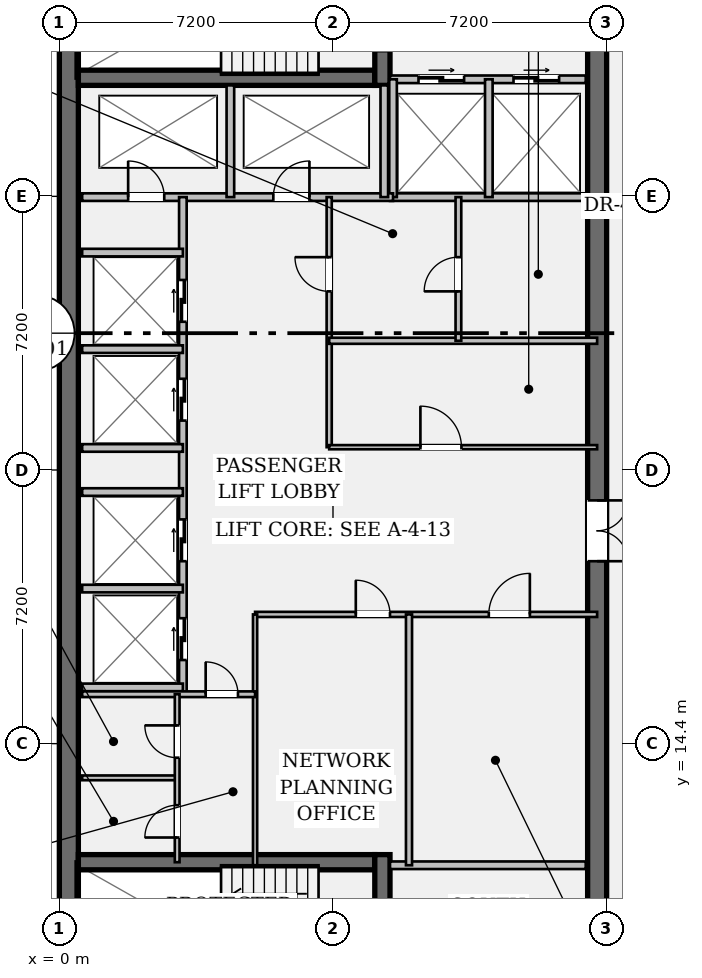
"""IFC4 building model, lengths in metres.
Left out: names, types, materials, properties, quantities, classifications, styles, units other than length and angle.
Written with IfcOpenShell. Run it as: python <this file> out.ifc"""

import sys

from ifc_helpers import new_model, si_unit, direction, frame, frame_2d, origin, place, context, subcontext, project, spatial, rectangle, extrude, element, fill, save


model = new_model("IFC4")
c1 = context("Model", 3, precision=1e-05, world=origin(), true_north=direction((0.0, 1.0)))
c2 = subcontext(c1, "Body", "Model", "MODEL_VIEW")
j1 = project(units=[si_unit("LENGTHUNIT", "METRE"), si_unit("PLANEANGLEUNIT", "RADIAN")], contexts=[c1])
p1 = place(None, origin())
s1 = spatial("IfcSite", under=j1, at=p1, CompositionType="ELEMENT")
p2 = place(p1, origin())
s2 = spatial("IfcBuilding", under=s1, at=p2, CompositionType="ELEMENT")
p3 = place(p2, frame((0.0, 0.0, 251.65)))
s3 = spatial("IfcBuildingStorey", under=s2, at=p3, CompositionType="ELEMENT", Elevation=251.65)
p4 = place(p3, frame((0.25, 7.2, 0.0), z_axis=(0.0, 0.0, 1.0), x_axis=(0.0, 1.0, 0.0)))
e1 = element("IfcWall", 1, at=p4, inside=s3, PredefinedType="SHEAR", context=c2, shape_type="SweptSolid", body=[
    extrude(rectangle(XDim=28.8, YDim=0.5, at=frame_2d((14.4, 0.0))), origin(), (0.0, 0.0, 1.0), 3.24),
])
p5 = place(p3, frame((14.15, 35.5, 0.0), z_axis=(0.0, 0.0, 1.0), x_axis=(0.0, -1.0, 0.0)))
e2 = element("IfcWall", 2, at=p5, inside=s3, PredefinedType="SHEAR", context=c2, shape_type="SweptSolid", body=[
    extrude(rectangle(XDim=27.8, YDim=0.5, at=frame_2d((13.9, 0.0))), origin(), (0.0, 0.0, 1.0), 3.24),
])
p6 = place(p5, frame((1.4, 0.0, 0.0)))
e3 = element("IfcOpeningElement", 3, at=p6, cuts=e2, PredefinedType="OPENING", context=c2, shape_type="SweptSolid", body=[
    extrude(rectangle(XDim=1.2, YDim=2.15, at=frame_2d((0.6, 1.075))), frame((0.0, 0.262, 0.0), z_axis=(0.0, -1.0, 0.0), x_axis=(1.0, 0.0, 0.0)), (0.0, 0.0, 1.0), 0.524),
])
p7 = place(p5, frame((25.35, 0.0, 0.0)))
e4 = element("IfcOpeningElement", 4, at=p7, cuts=e2, PredefinedType="OPENING", context=c2, shape_type="SweptSolid", body=[
    extrude(rectangle(XDim=1.2, YDim=2.15, at=frame_2d((0.6, 1.075))), frame((0.0, 0.262, 0.0), z_axis=(0.0, -1.0, 0.0), x_axis=(1.0, 0.0, 0.0)), (0.0, 0.0, 1.0), 0.524),
])
p8 = place(p5, frame((14.7, 0.0, 0.0)))
e5 = element("IfcOpeningElement", 5, at=p8, cuts=e2, PredefinedType="OPENING", context=c2, shape_type="SweptSolid", body=[
    extrude(rectangle(XDim=1.6, YDim=2.2, at=frame_2d((0.8, 1.1))), frame((0.0, 0.262, 0.0), z_axis=(0.0, -1.0, 0.0), x_axis=(1.0, 0.0, 0.0)), (0.0, 0.0, 1.0), 0.524),
])
for number, where, z_axis, x_axis in (
    (6, (0.5, 31.92, 0.0), (0.0, 0.0, 1.0), (1.0, 0.0, 0.0)),
    (7, (0.5, 11.28, 0.0), (0.0, 0.0, 1.0), (1.0, 0.0, 0.0)),
):
    element("IfcWall", number, at=place(p3, frame(where, z_axis=z_axis, x_axis=x_axis)), inside=s3, PredefinedType="SHEAR", context=c2, shape_type="SweptSolid", body=[
        extrude(rectangle(XDim=7.8, YDim=0.4, at=frame_2d((3.9, 0.0))), origin(), (0.0, 0.0, 1.0), 3.24),
    ])
p9 = place(p3, frame((8.5, 31.72, 0.0), z_axis=(0.0, 0.0, 1.0), x_axis=(0.0, 1.0, 0.0)))
e8 = element("IfcWall", 8, at=p9, inside=s3, PredefinedType="SHEAR", context=c2, shape_type="SweptSolid", body=[
    extrude(rectangle(XDim=3.78, YDim=0.4, at=frame_2d((1.89, 0.0))), origin(), (0.0, 0.0, 1.0), 3.24),
])
p10 = place(p9, frame((0.9, 0.0, 0.0)))
e9 = element("IfcOpeningElement", 9, at=p10, cuts=e8, PredefinedType="OPENING", context=c2, shape_type="SweptSolid", body=[
    extrude(rectangle(XDim=1.1, YDim=2.15, at=frame_2d((0.55, 1.075))), frame((0.0, 0.212, 0.0), z_axis=(0.0, -1.0, 0.0), x_axis=(1.0, 0.0, 0.0)), (0.0, 0.0, 1.0), 0.424),
])
p11 = place(p3, frame((8.5, 7.7, 0.0), z_axis=(0.0, 0.0, 1.0), x_axis=(0.0, 1.0, 0.0)))
e10 = element("IfcWall", 10, at=p11, inside=s3, PredefinedType="SHEAR", context=c2, shape_type="SweptSolid", body=[
    extrude(rectangle(XDim=3.78, YDim=0.4, at=frame_2d((1.89, 0.0))), origin(), (0.0, 0.0, 1.0), 3.24),
])
p12 = place(p11, frame((0.85, 0.0, 0.0)))
e11 = element("IfcOpeningElement", 11, at=p12, cuts=e10, PredefinedType="OPENING", context=c2, shape_type="SweptSolid", body=[
    extrude(rectangle(XDim=1.1, YDim=2.15, at=frame_2d((0.55, 1.075))), frame((0.0, 0.212, 0.0), z_axis=(0.0, -1.0, 0.0), x_axis=(1.0, 0.0, 0.0)), (0.0, 0.0, 1.0), 0.424),
])
p13 = place(p3, frame((8.7, 31.88, 0.0), z_axis=(0.0, 0.0, 1.0), x_axis=(1.0, 0.0, 0.0)))
e12 = element("IfcWall", 12, at=p13, inside=s3, PredefinedType="PARTITIONING", context=c2, shape_type="SweptSolid", body=[
    extrude(rectangle(XDim=5.15, YDim=0.2, at=frame_2d((2.575, 0.0))), origin(), (0.0, 0.0, 1.0), 3.24),
])
p14 = place(p13, frame((0.75, 0.0, 0.0)))
e13 = element("IfcOpeningElement", 13, at=p14, cuts=e12, PredefinedType="OPENING", context=c2, shape_type="SweptSolid", body=[
    extrude(rectangle(XDim=1.2, YDim=2.2, at=frame_2d((0.6, 1.1))), frame((0.0, 0.112, 0.0), z_axis=(0.0, -1.0, 0.0), x_axis=(1.0, 0.0, 0.0)), (0.0, 0.0, 1.0), 0.224),
])
p15 = place(p13, frame((3.25, 0.0, 0.0)))
e14 = element("IfcOpeningElement", 14, at=p15, cuts=e12, PredefinedType="OPENING", context=c2, shape_type="SweptSolid", body=[
    extrude(rectangle(XDim=1.2, YDim=2.2, at=frame_2d((0.6, 1.1))), frame((0.0, 0.112, 0.0), z_axis=(0.0, -1.0, 0.0), x_axis=(1.0, 0.0, 0.0)), (0.0, 0.0, 1.0), 0.224),
])
for number, where, z_axis, x_axis in (
    (15, (8.7, 11.2, 0.0), (0.0, 0.0, 1.0), (1.0, 0.0, 0.0)),
    (16, (8.7, 28.78, 0.0), (0.0, 0.0, 1.0), (1.0, 0.0, 0.0)),
):
    element("IfcWall", number, at=place(p3, frame(where, z_axis=z_axis, x_axis=x_axis)), inside=s3, PredefinedType="PARTITIONING", context=c2, shape_type="SweptSolid", body=[
        extrude(rectangle(XDim=5.15, YDim=0.2, at=frame_2d((2.575, 0.0))), origin(), (0.0, 0.0, 1.0), 3.24),
    ])
for number, where, z_axis, x_axis in (
    (17, (8.78, 28.78, 0.0), (0.0, 0.0, 1.0), (0.0, 1.0, 0.0)),
    (18, (11.3, 28.78, 0.0), (0.0, 0.0, 1.0), (0.0, 1.0, 0.0)),
):
    element("IfcWall", number, at=place(p3, frame(where, z_axis=z_axis, x_axis=x_axis)), inside=s3, PredefinedType="PARTITIONING", context=c2, shape_type="SweptSolid", body=[
        extrude(rectangle(XDim=3.1, YDim=0.2, at=frame_2d((1.55, 0.0))), origin(), (0.0, 0.0, 1.0), 3.24),
    ])
p16 = place(p3, frame((0.6, 28.78, 0.0), z_axis=(0.0, 0.0, 1.0), x_axis=(1.0, 0.0, 0.0)))
e19 = element("IfcWall", 19, at=p16, inside=s3, PredefinedType="PARTITIONING", context=c2, shape_type="SweptSolid", body=[
    extrude(rectangle(XDim=8.18, YDim=0.2, at=frame_2d((4.09, 0.0))), origin(), (0.0, 0.0, 1.0), 3.24),
])
p17 = place(p16, frame((1.21, 0.0, 0.0)))
e20 = element("IfcOpeningElement", 20, at=p17, cuts=e19, PredefinedType="OPENING", context=c2, shape_type="SweptSolid", body=[
    extrude(rectangle(XDim=0.95, YDim=2.15, at=frame_2d((0.475, 1.075))), frame((0.0, 0.112, 0.0), z_axis=(0.0, -1.0, 0.0), x_axis=(1.0, 0.0, 0.0)), (0.0, 0.0, 1.0), 0.224),
])
p18 = place(p16, frame((5.03, 0.0, 0.0)))
e21 = element("IfcOpeningElement", 21, at=p18, cuts=e19, PredefinedType="OPENING", context=c2, shape_type="SweptSolid", body=[
    extrude(rectangle(XDim=0.95, YDim=2.15, at=frame_2d((0.475, 1.075))), frame((0.0, 0.112, 0.0), z_axis=(0.0, -1.0, 0.0), x_axis=(1.0, 0.0, 0.0)), (0.0, 0.0, 1.0), 0.224),
])
for number, where, z_axis, x_axis in (
    (22, (4.5, 28.78, 0.0), (0.0, 0.0, 1.0), (0.0, 1.0, 0.0)),
    (23, (8.55, 28.78, 0.0), (0.0, 0.0, 1.0), (0.0, 1.0, 0.0)),
):
    element("IfcWall", number, at=place(p3, frame(where, z_axis=z_axis, x_axis=x_axis)), inside=s3, PredefinedType="PARTITIONING", context=c2, shape_type="SweptSolid", body=[
        extrude(rectangle(XDim=2.94, YDim=0.2, at=frame_2d((1.47, 0.0))), origin(), (0.0, 0.0, 1.0), 3.24),
    ])
p19 = place(p3, frame((3.25, 15.7, 0.0), z_axis=(0.0, 0.0, 1.0), x_axis=(0.0, 1.0, 0.0)))
e24 = element("IfcWall", 24, at=p19, inside=s3, PredefinedType="PARTITIONING", context=c2, shape_type="SweptSolid", body=[
    extrude(rectangle(XDim=13.08, YDim=0.2, at=frame_2d((6.54, 0.0))), origin(), (0.0, 0.0, 1.0), 3.24),
])
p20 = place(p19, frame((0.9, 0.0, 0.0)))
e25 = element("IfcOpeningElement", 25, at=p20, cuts=e24, PredefinedType="OPENING", context=c2, shape_type="SweptSolid", body=[
    extrude(rectangle(XDim=1.1, YDim=2.2, at=frame_2d((0.55, 1.1))), frame((0.0, 0.112, 0.0), z_axis=(0.0, -1.0, 0.0), x_axis=(1.0, 0.0, 0.0)), (0.0, 0.0, 1.0), 0.224),
])
p21 = place(p19, frame((3.5, 0.0, 0.0)))
e26 = element("IfcOpeningElement", 26, at=p21, cuts=e24, PredefinedType="OPENING", context=c2, shape_type="SweptSolid", body=[
    extrude(rectangle(XDim=1.1, YDim=2.2, at=frame_2d((0.55, 1.1))), frame((0.0, 0.112, 0.0), z_axis=(0.0, -1.0, 0.0), x_axis=(1.0, 0.0, 0.0)), (0.0, 0.0, 1.0), 0.224),
])
p22 = place(p19, frame((7.2, 0.0, 0.0)))
e27 = element("IfcOpeningElement", 27, at=p22, cuts=e24, PredefinedType="OPENING", context=c2, shape_type="SweptSolid", body=[
    extrude(rectangle(XDim=1.1, YDim=2.2, at=frame_2d((0.55, 1.1))), frame((0.0, 0.112, 0.0), z_axis=(0.0, -1.0, 0.0), x_axis=(1.0, 0.0, 0.0)), (0.0, 0.0, 1.0), 0.224),
])
p23 = place(p19, frame((9.8, 0.0, 0.0)))
e28 = element("IfcOpeningElement", 28, at=p23, cuts=e24, PredefinedType="OPENING", context=c2, shape_type="SweptSolid", body=[
    extrude(rectangle(XDim=1.1, YDim=2.2, at=frame_2d((0.55, 1.1))), frame((0.0, 0.112, 0.0), z_axis=(0.0, -1.0, 0.0), x_axis=(1.0, 0.0, 0.0)), (0.0, 0.0, 1.0), 0.224),
])
for number, where, z_axis, x_axis in (
    (29, (0.6, 15.88, 0.0), (0.0, 0.0, 1.0), (1.0, 0.0, 0.0)),
    (30, (0.6, 18.48, 0.0), (0.0, 0.0, 1.0), (1.0, 0.0, 0.0)),
    (31, (0.6, 22.18, 0.0), (0.0, 0.0, 1.0), (1.0, 0.0, 0.0)),
    (32, (0.6, 24.78, 0.0), (0.0, 0.0, 1.0), (1.0, 0.0, 0.0)),
    (33, (0.6, 21.02, 0.0), (0.0, 0.0, 1.0), (1.0, 0.0, 0.0)),
    (34, (0.6, 27.32, 0.0), (0.0, 0.0, 1.0), (1.0, 0.0, 0.0)),
):
    element("IfcWall", number, at=place(p3, frame(where, z_axis=z_axis, x_axis=x_axis)), inside=s3, PredefinedType="PARTITIONING", context=c2, shape_type="SweptSolid", body=[
        extrude(rectangle(XDim=2.65, YDim=0.2, at=frame_2d((1.325, 0.0))), origin(), (0.0, 0.0, 1.0), 3.24),
    ])
p24 = place(p3, frame((7.1, 22.2, 0.0), z_axis=(0.0, 0.0, 1.0), x_axis=(0.0, 1.0, 0.0)))
e35 = element("IfcWall", 35, at=p24, inside=s3, PredefinedType="PARTITIONING", context=c2, shape_type="SweptSolid", body=[
    extrude(rectangle(XDim=6.58, YDim=0.135, at=frame_2d((3.29, 0.0))), origin(), (0.0, 0.0, 1.0), 3.24),
])
p25 = place(p24, frame((4.1, 0.0, 0.0)))
e36 = element("IfcOpeningElement", 36, at=p25, cuts=e35, PredefinedType="OPENING", context=c2, shape_type="SweptSolid", body=[
    extrude(rectangle(XDim=0.9, YDim=2.15, at=frame_2d((0.45, 1.075))), frame((0.0, 0.08, 0.0), z_axis=(0.0, -1.0, 0.0), x_axis=(1.0, 0.0, 0.0)), (0.0, 0.0, 1.0), 0.159),
])
p26 = place(p3, frame((7.1, 22.2, 0.0), z_axis=(0.0, 0.0, 1.0), x_axis=(1.0, 0.0, 0.0)))
e37 = element("IfcWall", 37, at=p26, inside=s3, PredefinedType="PARTITIONING", context=c2, shape_type="SweptSolid", body=[
    extrude(rectangle(XDim=7.05, YDim=0.11, at=frame_2d((3.525, 0.0))), origin(), (0.0, 0.0, 1.0), 3.24),
])
p27 = place(p26, frame((2.4, 0.0, 0.0)))
e38 = element("IfcOpeningElement", 38, at=p27, cuts=e37, PredefinedType="OPENING", context=c2, shape_type="SweptSolid", body=[
    extrude(rectangle(XDim=1.08, YDim=2.15, at=frame_2d((0.54, 1.075))), frame((0.0, 0.067, 0.0), z_axis=(0.0, -1.0, 0.0), x_axis=(1.0, 0.0, 0.0)), (0.0, 0.0, 1.0), 0.134),
])
p28 = place(p3, frame((7.1, 25.0, 0.0), z_axis=(0.0, 0.0, 1.0), x_axis=(1.0, 0.0, 0.0)))
e39 = element("IfcWall", 39, at=p28, inside=s3, PredefinedType="PARTITIONING", context=c2, shape_type="SweptSolid", body=[
    extrude(rectangle(XDim=7.05, YDim=0.16, at=frame_2d((3.525, 0.0))), origin(), (0.0, 0.0, 1.0), 3.24),
])
p29 = place(p3, frame((10.5, 25.0, 0.0), z_axis=(0.0, 0.0, 1.0), x_axis=(0.0, 1.0, 0.0)))
e40 = element("IfcWall", 40, at=p29, inside=s3, PredefinedType="PARTITIONING", context=c2, shape_type="SweptSolid", body=[
    extrude(rectangle(XDim=3.78, YDim=0.15, at=frame_2d((1.89, 0.0))), origin(), (0.0, 0.0, 1.0), 3.24),
])
p30 = place(p29, frame((1.3, 0.0, 0.0)))
e41 = element("IfcOpeningElement", 41, at=p30, cuts=e40, PredefinedType="OPENING", context=c2, shape_type="SweptSolid", body=[
    extrude(rectangle(XDim=0.9, YDim=2.15, at=frame_2d((0.45, 1.075))), frame((0.0, 0.087, 0.0), z_axis=(0.0, -1.0, 0.0), x_axis=(1.0, 0.0, 0.0)), (0.0, 0.0, 1.0), 0.174),
])
p31 = place(p3, frame((5.15, 17.8, 0.0), z_axis=(0.0, 0.0, 1.0), x_axis=(1.0, 0.0, 0.0)))
e42 = element("IfcWall", 42, at=p31, inside=s3, PredefinedType="PARTITIONING", context=c2, shape_type="SweptSolid", body=[
    extrude(rectangle(XDim=9.0, YDim=0.135, at=frame_2d((4.5, 0.0))), origin(), (0.0, 0.0, 1.0), 3.24),
])
p32 = place(p31, frame((2.65, 0.0, 0.0)))
e43 = element("IfcOpeningElement", 43, at=p32, cuts=e42, PredefinedType="OPENING", context=c2, shape_type="SweptSolid", body=[
    extrude(rectangle(XDim=0.9, YDim=2.15, at=frame_2d((0.45, 1.075))), frame((0.0, 0.08, 0.0), z_axis=(0.0, -1.0, 0.0), x_axis=(1.0, 0.0, 0.0)), (0.0, 0.0, 1.0), 0.159),
])
p33 = place(p31, frame((6.15, 0.0, 0.0)))
e44 = element("IfcOpeningElement", 44, at=p33, cuts=e42, PredefinedType="OPENING", context=c2, shape_type="SweptSolid", body=[
    extrude(rectangle(XDim=1.08, YDim=2.15, at=frame_2d((0.54, 1.075))), frame((0.0, 0.08, 0.0), z_axis=(0.0, -1.0, 0.0), x_axis=(1.0, 0.0, 0.0)), (0.0, 0.0, 1.0), 0.159),
])
p34 = place(p3, frame((5.15, 11.2, 0.0), z_axis=(0.0, 0.0, 1.0), x_axis=(0.0, 1.0, 0.0)))
e45 = element("IfcWall", 45, at=p34, inside=s3, PredefinedType="PARTITIONING", context=c2, shape_type="SweptSolid", body=[
    extrude(rectangle(XDim=6.6, YDim=0.11, at=frame_2d((3.3, 0.0))), origin(), (0.0, 0.0, 1.0), 3.24),
])
p35 = place(p3, frame((9.2, 11.2, 0.0), z_axis=(0.0, 0.0, 1.0), x_axis=(0.0, 1.0, 0.0)))
e46 = element("IfcWall", 46, at=p35, inside=s3, PredefinedType="PARTITIONING", context=c2, shape_type="SweptSolid", body=[
    extrude(rectangle(XDim=6.6, YDim=0.16, at=frame_2d((3.3, 0.0))), origin(), (0.0, 0.0, 1.0), 3.24),
])
p36 = place(p3, frame((0.6, 15.7, 0.0), z_axis=(0.0, 0.0, 1.0), x_axis=(1.0, 0.0, 0.0)))
e47 = element("IfcWall", 47, at=p36, inside=s3, PredefinedType="PARTITIONING", context=c2, shape_type="SweptSolid", body=[
    extrude(rectangle(XDim=4.55, YDim=0.15, at=frame_2d((2.275, 0.0))), origin(), (0.0, 0.0, 1.0), 3.24),
])
p37 = place(p36, frame((3.25, 0.0, 0.0)))
e48 = element("IfcOpeningElement", 48, at=p37, cuts=e47, PredefinedType="OPENING", context=c2, shape_type="SweptSolid", body=[
    extrude(rectangle(XDim=0.85, YDim=2.15, at=frame_2d((0.425, 1.075))), frame((0.0, 0.087, 0.0), z_axis=(0.0, -1.0, 0.0), x_axis=(1.0, 0.0, 0.0)), (0.0, 0.0, 1.0), 0.174),
])
p38 = place(p3, frame((0.6, 13.5, 0.0), z_axis=(0.0, 0.0, 1.0), x_axis=(1.0, 0.0, 0.0)))
e49 = element("IfcWall", 49, at=p38, inside=s3, PredefinedType="PARTITIONING", context=c2, shape_type="SweptSolid", body=[
    extrude(rectangle(XDim=2.5, YDim=0.125, at=frame_2d((1.25, 0.0))), origin(), (0.0, 0.0, 1.0), 3.24),
])
p39 = place(p3, frame((3.1, 11.28, 0.0), z_axis=(0.0, 0.0, 1.0), x_axis=(0.0, 1.0, 0.0)))
e50 = element("IfcWall", 50, at=p39, inside=s3, PredefinedType="PARTITIONING", context=c2, shape_type="SweptSolid", body=[
    extrude(rectangle(XDim=4.42, YDim=0.125, at=frame_2d((2.21, 0.0))), origin(), (0.0, 0.0, 1.0), 3.24),
])
p40 = place(p39, frame((0.65, 0.0, 0.0)))
e51 = element("IfcOpeningElement", 51, at=p40, cuts=e50, PredefinedType="OPENING", context=c2, shape_type="SweptSolid", body=[
    extrude(rectangle(XDim=0.85, YDim=2.15, at=frame_2d((0.425, 1.075))), frame((0.0, 0.074, 0.0), z_axis=(0.0, -1.0, 0.0), x_axis=(1.0, 0.0, 0.0)), (0.0, 0.0, 1.0), 0.149),
])
p41 = place(p39, frame((2.75, 0.0, 0.0)))
e52 = element("IfcOpeningElement", 52, at=p41, cuts=e50, PredefinedType="OPENING", context=c2, shape_type="SweptSolid", body=[
    extrude(rectangle(XDim=0.85, YDim=2.15, at=frame_2d((0.425, 1.075))), frame((0.0, 0.074, 0.0), z_axis=(0.0, -1.0, 0.0), x_axis=(1.0, 0.0, 0.0)), (0.0, 0.0, 1.0), 0.149),
])
p42 = place(p14, origin())
e53 = element("IfcDoor", 53, at=p42, inside=s3, OperationType="DOUBLE_DOOR_SLIDING", PredefinedType="DOOR", context=c2, shape_type="SweptSolid", body=[
    extrude(rectangle(XDim=1.2, YDim=2.2, at=frame_2d((0.6, 1.1))), frame((0.0, 0.025, 0.0), z_axis=(0.0, -1.0, 0.0), x_axis=(1.0, 0.0, 0.0)), (0.0, 0.0, 1.0), 0.05),
])
fill(e13, e53)
p43 = place(p15, origin())
e54 = element("IfcDoor", 54, at=p43, inside=s3, OperationType="DOUBLE_DOOR_SLIDING", PredefinedType="DOOR", context=c2, shape_type="SweptSolid", body=[
    extrude(rectangle(XDim=1.2, YDim=2.2, at=frame_2d((0.6, 1.1))), frame((0.0, 0.025, 0.0), z_axis=(0.0, -1.0, 0.0), x_axis=(1.0, 0.0, 0.0)), (0.0, 0.0, 1.0), 0.05),
])
fill(e14, e54)
p44 = place(p17, origin())
e55 = element("IfcDoor", 55, at=p44, inside=s3, OperationType="SINGLE_SWING_LEFT", PredefinedType="DOOR", context=c2, shape_type="SweptSolid", body=[
    extrude(rectangle(XDim=0.95, YDim=2.15, at=frame_2d((0.475, 1.075))), frame((0.0, 0.025, 0.0), z_axis=(0.0, -1.0, 0.0), x_axis=(1.0, 0.0, 0.0)), (0.0, 0.0, 1.0), 0.05),
])
fill(e20, e55)
p45 = place(p18, origin())
e56 = element("IfcDoor", 56, at=p45, inside=s3, OperationType="SINGLE_SWING_RIGHT", PredefinedType="DOOR", context=c2, shape_type="SweptSolid", body=[
    extrude(rectangle(XDim=0.95, YDim=2.15, at=frame_2d((0.475, 1.075))), frame((0.0, 0.025, 0.0), z_axis=(0.0, -1.0, 0.0), x_axis=(1.0, 0.0, 0.0)), (0.0, 0.0, 1.0), 0.05),
])
fill(e21, e56)
p46 = place(p8, origin())
e57 = element("IfcDoor", 57, at=p46, inside=s3, OperationType="DOUBLE_DOOR_SINGLE_SWING", PredefinedType="DOOR", context=c2, shape_type="SweptSolid", body=[
    extrude(rectangle(XDim=1.6, YDim=2.2, at=frame_2d((0.8, 1.1))), frame((0.0, 0.025, 0.0), z_axis=(0.0, -1.0, 0.0), x_axis=(1.0, 0.0, 0.0)), (0.0, 0.0, 1.0), 0.05),
])
fill(e5, e57)
p47 = place(p20, origin())
e58 = element("IfcDoor", 58, at=p47, inside=s3, OperationType="DOUBLE_DOOR_SLIDING", PredefinedType="DOOR", context=c2, shape_type="SweptSolid", body=[
    extrude(rectangle(XDim=1.1, YDim=2.2, at=frame_2d((0.55, 1.1))), frame((0.0, 0.025, 0.0), z_axis=(0.0, -1.0, 0.0), x_axis=(1.0, 0.0, 0.0)), (0.0, 0.0, 1.0), 0.05),
])
fill(e25, e58)
p48 = place(p21, origin())
e59 = element("IfcDoor", 59, at=p48, inside=s3, OperationType="DOUBLE_DOOR_SLIDING", PredefinedType="DOOR", context=c2, shape_type="SweptSolid", body=[
    extrude(rectangle(XDim=1.1, YDim=2.2, at=frame_2d((0.55, 1.1))), frame((0.0, 0.025, 0.0), z_axis=(0.0, -1.0, 0.0), x_axis=(1.0, 0.0, 0.0)), (0.0, 0.0, 1.0), 0.05),
])
fill(e26, e59)
p49 = place(p22, origin())
e60 = element("IfcDoor", 60, at=p49, inside=s3, OperationType="DOUBLE_DOOR_SLIDING", PredefinedType="DOOR", context=c2, shape_type="SweptSolid", body=[
    extrude(rectangle(XDim=1.1, YDim=2.2, at=frame_2d((0.55, 1.1))), frame((0.0, 0.025, 0.0), z_axis=(0.0, -1.0, 0.0), x_axis=(1.0, 0.0, 0.0)), (0.0, 0.0, 1.0), 0.05),
])
fill(e27, e60)
p50 = place(p23, origin())
e61 = element("IfcDoor", 61, at=p50, inside=s3, OperationType="DOUBLE_DOOR_SLIDING", PredefinedType="DOOR", context=c2, shape_type="SweptSolid", body=[
    extrude(rectangle(XDim=1.1, YDim=2.2, at=frame_2d((0.55, 1.1))), frame((0.0, 0.025, 0.0), z_axis=(0.0, -1.0, 0.0), x_axis=(1.0, 0.0, 0.0)), (0.0, 0.0, 1.0), 0.05),
])
fill(e28, e61)
p51 = place(p27, origin())
e62 = element("IfcDoor", 62, at=p51, inside=s3, OperationType="SINGLE_SWING_LEFT", PredefinedType="DOOR", context=c2, shape_type="SweptSolid", body=[
    extrude(rectangle(XDim=1.08, YDim=2.15, at=frame_2d((0.54, 1.075))), frame((0.0, 0.025, 0.0), z_axis=(0.0, -1.0, 0.0), x_axis=(1.0, 0.0, 0.0)), (0.0, 0.0, 1.0), 0.05),
])
fill(e38, e62)
p52 = place(p25, origin())
e63 = element("IfcDoor", 63, at=p52, inside=s3, OperationType="SINGLE_SWING_RIGHT", PredefinedType="DOOR", context=c2, shape_type="SweptSolid", body=[
    extrude(rectangle(XDim=0.9, YDim=2.15, at=frame_2d((0.45, 1.075))), frame((0.0, 0.025, 0.0), z_axis=(0.0, -1.0, 0.0), x_axis=(1.0, 0.0, 0.0)), (0.0, 0.0, 1.0), 0.05),
])
fill(e36, e63)
p53 = place(p30, origin())
e64 = element("IfcDoor", 64, at=p53, inside=s3, OperationType="SINGLE_SWING_LEFT", PredefinedType="DOOR", context=c2, shape_type="SweptSolid", body=[
    extrude(rectangle(XDim=0.9, YDim=2.15, at=frame_2d((0.45, 1.075))), frame((0.0, 0.025, 0.0), z_axis=(0.0, -1.0, 0.0), x_axis=(1.0, 0.0, 0.0)), (0.0, 0.0, 1.0), 0.05),
])
fill(e41, e64)
p54 = place(p32, origin())
e65 = element("IfcDoor", 65, at=p54, inside=s3, OperationType="SINGLE_SWING_LEFT", PredefinedType="DOOR", context=c2, shape_type="SweptSolid", body=[
    extrude(rectangle(XDim=0.9, YDim=2.15, at=frame_2d((0.45, 1.075))), frame((0.0, 0.025, 0.0), z_axis=(0.0, -1.0, 0.0), x_axis=(1.0, 0.0, 0.0)), (0.0, 0.0, 1.0), 0.05),
])
fill(e43, e65)
p55 = place(p33, origin())
e66 = element("IfcDoor", 66, at=p55, inside=s3, OperationType="SINGLE_SWING_RIGHT", PredefinedType="DOOR", context=c2, shape_type="SweptSolid", body=[
    extrude(rectangle(XDim=1.08, YDim=2.15, at=frame_2d((0.54, 1.075))), frame((0.0, 0.025, 0.0), z_axis=(0.0, -1.0, 0.0), x_axis=(1.0, 0.0, 0.0)), (0.0, 0.0, 1.0), 0.05),
])
fill(e44, e66)
p56 = place(p37, origin())
e67 = element("IfcDoor", 67, at=p56, inside=s3, OperationType="SINGLE_SWING_LEFT", PredefinedType="DOOR", context=c2, shape_type="SweptSolid", body=[
    extrude(rectangle(XDim=0.85, YDim=2.15, at=frame_2d((0.425, 1.075))), frame((0.0, 0.025, 0.0), z_axis=(0.0, -1.0, 0.0), x_axis=(1.0, 0.0, 0.0)), (0.0, 0.0, 1.0), 0.05),
])
fill(e48, e67)
p57 = place(p40, origin())
e68 = element("IfcDoor", 68, at=p57, inside=s3, OperationType="SINGLE_SWING_LEFT", PredefinedType="DOOR", context=c2, shape_type="SweptSolid", body=[
    extrude(rectangle(XDim=0.85, YDim=2.15, at=frame_2d((0.425, 1.075))), frame((0.0, 0.025, 0.0), z_axis=(0.0, -1.0, 0.0), x_axis=(1.0, 0.0, 0.0)), (0.0, 0.0, 1.0), 0.05),
])
fill(e51, e68)
p58 = place(p41, origin())
e69 = element("IfcDoor", 69, at=p58, inside=s3, OperationType="SINGLE_SWING_RIGHT", PredefinedType="DOOR", context=c2, shape_type="SweptSolid", body=[
    extrude(rectangle(XDim=0.85, YDim=2.15, at=frame_2d((0.425, 1.075))), frame((0.0, 0.025, 0.0), z_axis=(0.0, -1.0, 0.0), x_axis=(1.0, 0.0, 0.0)), (0.0, 0.0, 1.0), 0.05),
])
fill(e52, e69)
save(model, sys.argv[1])
